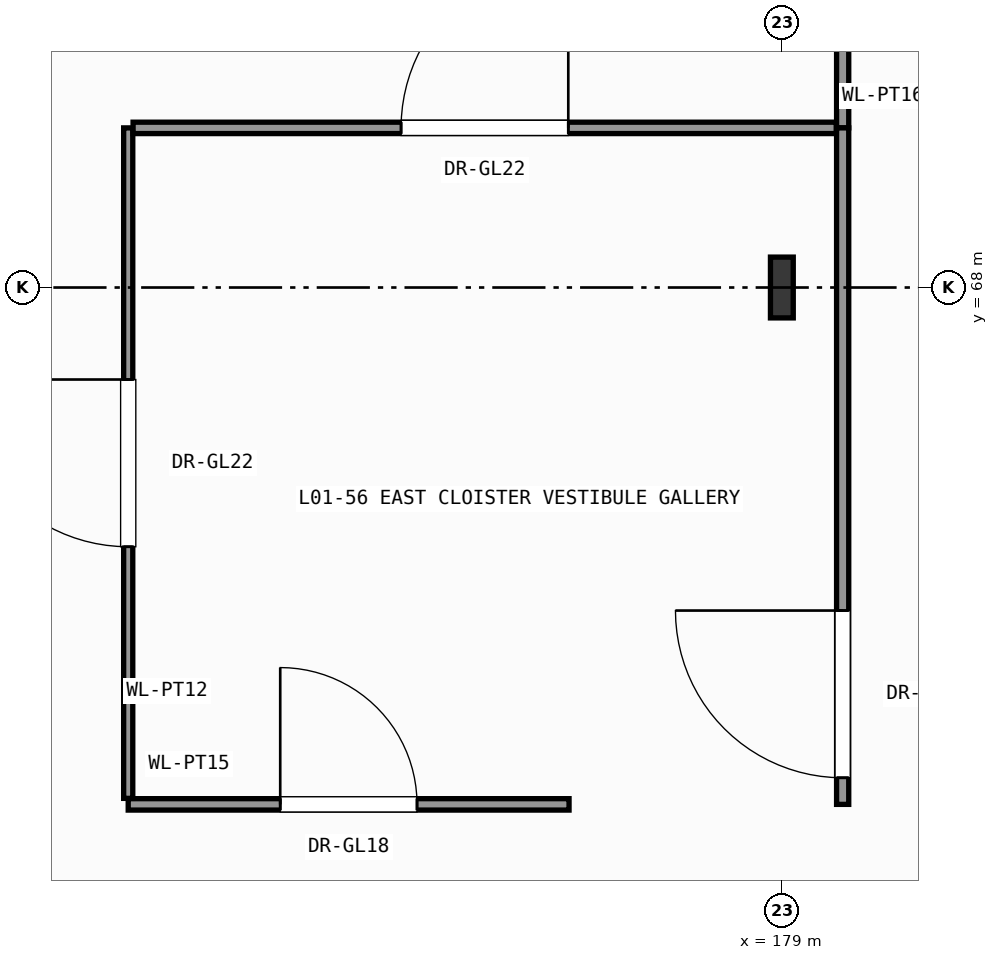
"""IFC4 building model, lengths in metres.
Left out: names, types, materials, properties, quantities, classifications, styles, units other than length and angle.
Written with IfcOpenShell. Run it as: python <this file> out.ifc"""

import sys

from ifc_helpers import new_model, si_unit, direction, frame, frame_2d, origin, origin_2d, place, context, subcontext, project, spatial, rectangle, i_section, extrude, element, fill, save


model = new_model("IFC4")
c1 = context("Model", 3, precision=1e-05, world=origin(), true_north=direction((0.0, 1.0)))
c2 = subcontext(c1, "Body", "Model", "MODEL_VIEW")
j1 = project(units=[si_unit("LENGTHUNIT", "METRE"), si_unit("PLANEANGLEUNIT", "RADIAN")], contexts=[c1])
p1 = place(None, origin())
s1 = spatial("IfcSite", under=j1, at=p1, CompositionType="ELEMENT")
p2 = place(p1, origin())
s2 = spatial("IfcBuilding", under=s1, at=p2, CompositionType="ELEMENT")
p3 = place(p2, origin())
s3 = spatial("IfcBuildingStorey", under=s2, at=p3, CompositionType="ELEMENT", Elevation=0.0)
p4 = place(p3, frame((179.0, 68.0, 0.0), z_axis=(0.0, 0.0, 1.0), x_axis=(1.0, 0.0, 0.0)))
e1 = element("IfcColumn", 1, at=p4, inside=s3, PredefinedType="COLUMN", context=c2, shape_type="SweptSolid", body=[
    extrude(i_section(OverallWidth=0.3, OverallDepth=0.8, WebThickness=0.018, FlangeThickness=0.033, FilletRadius=0.03, at=origin_2d()), origin(), (0.0, 0.0, 1.0), 7.8),
])
p5 = place(p3, frame((170.4, 61.2, 0.0), z_axis=(0.0, 0.0, 1.0), x_axis=(1.0, 0.0, 0.0)))
e2 = element("IfcWall", 2, at=p5, inside=s3, PredefinedType="PARTITIONING", context=c2, shape_type="SweptSolid", body=[
    extrude(rectangle(XDim=5.8, YDim=0.15, at=frame_2d((2.9, 0.0))), origin(), (0.0, 0.0, 1.0), 7.54),
])
p6 = place(p5, frame((2.0, 0.0, 0.0)))
e3 = element("IfcOpeningElement", 3, at=p6, cuts=e2, PredefinedType="OPENING", context=c2, shape_type="SweptSolid", body=[
    extrude(rectangle(XDim=1.8, YDim=2.4, at=frame_2d((0.9, 1.2))), frame((0.0, 0.085, 0.0), z_axis=(0.0, -1.0, 0.0), x_axis=(1.0, 0.0, 0.0)), (0.0, 0.0, 1.0), 0.17),
])
p7 = place(p3, frame((170.4, 61.279, 0.0), z_axis=(0.0, 0.0, 1.0), x_axis=(0.0, 1.0, 0.0)))
e4 = element("IfcWall", 4, at=p7, inside=s3, PredefinedType="PARTITIONING", context=c2, shape_type="SweptSolid", body=[
    extrude(rectangle(XDim=8.821, YDim=0.12, at=frame_2d((4.411, 0.0))), origin(), (0.0, 0.0, 1.0), 7.54),
])
p8 = place(p7, frame((3.311, 0.0, 0.0)))
e5 = element("IfcOpeningElement", 5, at=p8, cuts=e4, PredefinedType="OPENING", context=c2, shape_type="SweptSolid", body=[
    extrude(rectangle(XDim=2.2, YDim=2.6, at=frame_2d((1.1, 1.3))), frame((0.0, 0.07, 0.0), z_axis=(0.0, -1.0, 0.0), x_axis=(1.0, 0.0, 0.0)), (0.0, 0.0, 1.0), 0.14),
])
p9 = place(p3, frame((179.8, 70.1, 0.0), z_axis=(0.0, 0.0, 1.0), x_axis=(0.0, 1.0, 0.0)))
e6 = element("IfcWall", 6, at=p9, inside=s3, PredefinedType="PARTITIONING", context=c2, shape_type="SweptSolid", body=[
    extrude(rectangle(XDim=3.4, YDim=0.16, at=frame_2d((1.7, 0.0))), origin(), (0.0, 0.0, 1.0), 7.54),
])
p10 = place(p9, frame((1.2, 0.0, 0.0)))
e7 = element("IfcOpeningElement", 7, at=p10, cuts=e6, PredefinedType="OPENING", context=c2, shape_type="SweptSolid", body=[
    extrude(rectangle(XDim=1.0, YDim=2.15, at=frame_2d((0.5, 1.075))), frame((0.0, 0.09, 0.0), z_axis=(0.0, -1.0, 0.0), x_axis=(1.0, 0.0, 0.0)), (0.0, 0.0, 1.0), 0.18),
])
p11 = place(p3, frame((170.464, 70.1, 0.0), z_axis=(0.0, 0.0, 1.0), x_axis=(1.0, 0.0, 0.0)))
e8 = element("IfcWall", 8, at=p11, inside=s3, PredefinedType="PARTITIONING", context=c2, shape_type="SweptSolid", body=[
    extrude(rectangle(XDim=9.252, YDim=0.15, at=frame_2d((4.626, 0.0))), origin(), (0.0, 0.0, 1.0), 7.54),
])
p12 = place(p11, frame((3.526, 0.0, 0.0)))
e9 = element("IfcOpeningElement", 9, at=p12, cuts=e8, PredefinedType="OPENING", context=c2, shape_type="SweptSolid", body=[
    extrude(rectangle(XDim=2.2, YDim=2.6, at=frame_2d((1.1, 1.3))), frame((0.0, 0.085, 0.0), z_axis=(0.0, -1.0, 0.0), x_axis=(1.0, 0.0, 0.0)), (0.0, 0.0, 1.0), 0.17),
])
p13 = place(p3, frame((179.8, 61.2, 0.0), z_axis=(0.0, 0.0, 1.0), x_axis=(0.0, 1.0, 0.0)))
e10 = element("IfcWall", 10, at=p13, inside=s3, PredefinedType="PARTITIONING", context=c2, shape_type="SweptSolid", body=[
    extrude(rectangle(XDim=8.9, YDim=0.16, at=frame_2d((4.45, 0.0))), origin(), (0.0, 0.0, 1.0), 7.54),
])
p14 = place(p13, frame((0.35, 0.0, 0.0)))
e11 = element("IfcOpeningElement", 11, at=p14, cuts=e10, PredefinedType="OPENING", context=c2, shape_type="SweptSolid", body=[
    extrude(rectangle(XDim=2.2, YDim=2.6, at=frame_2d((1.1, 1.3))), frame((0.0, 0.09, 0.0), z_axis=(0.0, -1.0, 0.0), x_axis=(1.0, 0.0, 0.0)), (0.0, 0.0, 1.0), 0.18),
])
p15 = place(p6, origin())
e12 = element("IfcDoor", 12, at=p15, inside=s3, OperationType="SINGLE_SWING_LEFT", PredefinedType="DOOR", context=c2, shape_type="SweptSolid", body=[
    extrude(rectangle(XDim=1.8, YDim=2.4, at=frame_2d((0.9, 1.2))), frame((0.0, 0.025, 0.0), z_axis=(0.0, -1.0, 0.0), x_axis=(1.0, 0.0, 0.0)), (0.0, 0.0, 1.0), 0.05),
])
fill(e3, e12)
p16 = place(p8, origin())
e13 = element("IfcDoor", 13, at=p16, inside=s3, OperationType="SINGLE_SWING_RIGHT", PredefinedType="DOOR", context=c2, shape_type="SweptSolid", body=[
    extrude(rectangle(XDim=2.2, YDim=2.6, at=frame_2d((1.1, 1.3))), frame((0.0, 0.025, 0.0), z_axis=(0.0, -1.0, 0.0), x_axis=(1.0, 0.0, 0.0)), (0.0, 0.0, 1.0), 0.05),
])
fill(e5, e13)
p17 = place(p12, origin())
e14 = element("IfcDoor", 14, at=p17, inside=s3, OperationType="SINGLE_SWING_RIGHT", PredefinedType="DOOR", context=c2, shape_type="SweptSolid", body=[
    extrude(rectangle(XDim=2.2, YDim=2.6, at=frame_2d((1.1, 1.3))), frame((0.0, 0.025, 0.0), z_axis=(0.0, -1.0, 0.0), x_axis=(1.0, 0.0, 0.0)), (0.0, 0.0, 1.0), 0.05),
])
fill(e9, e14)
p18 = place(p14, origin())
e15 = element("IfcDoor", 15, at=p18, inside=s3, OperationType="SINGLE_SWING_RIGHT", PredefinedType="DOOR", context=c2, shape_type="SweptSolid", body=[
    extrude(rectangle(XDim=2.2, YDim=2.6, at=frame_2d((1.1, 1.3))), frame((0.0, 0.025, 0.0), z_axis=(0.0, -1.0, 0.0), x_axis=(1.0, 0.0, 0.0)), (0.0, 0.0, 1.0), 0.05),
])
fill(e11, e15)
save(model, sys.argv[1])
